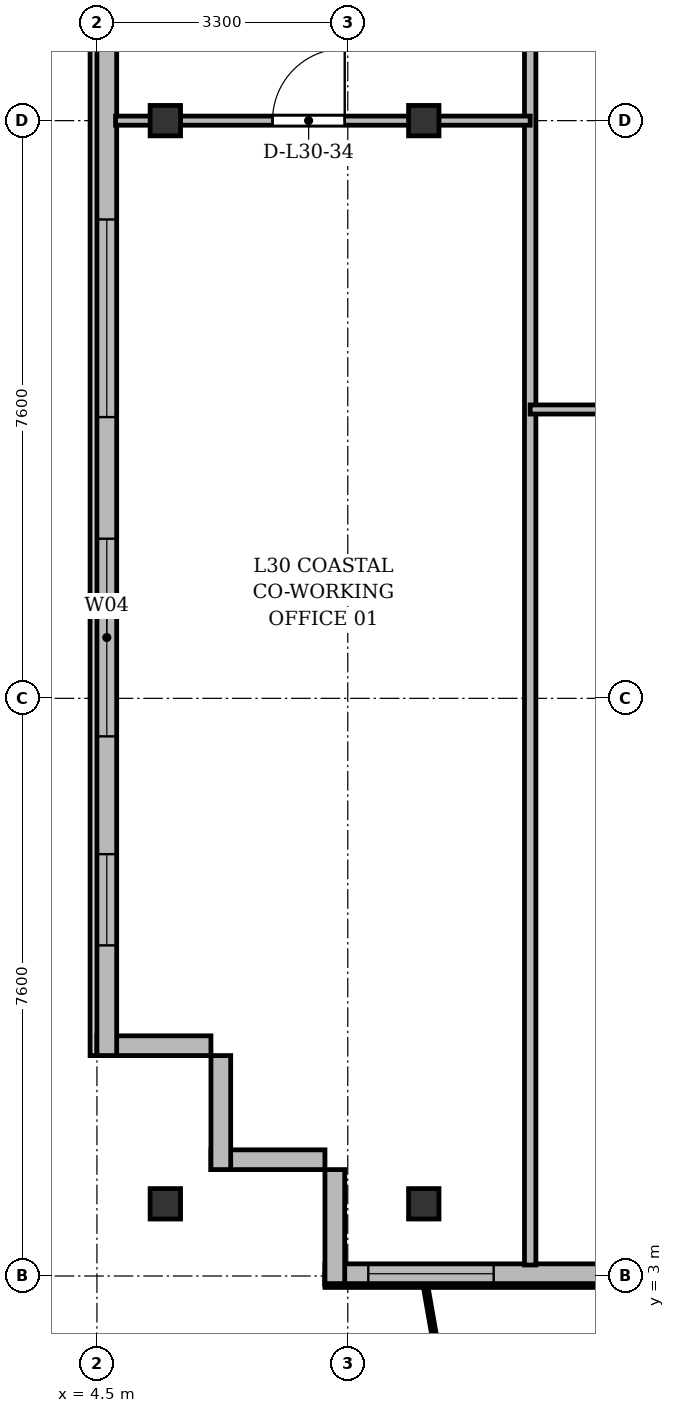
"""IFC4 building model, lengths in metres.
Left out: names, types, materials, properties, quantities, classifications, styles, units other than length and angle.
Written with IfcOpenShell. Run it as: python <this file> out.ifc"""

import sys

from ifc_helpers import new_model, si_unit, direction, frame, frame_2d, origin, origin_2d, place, context, subcontext, project, spatial, rectangle, i_section, extrude, source, transform, mapped, element, fill, save


model = new_model("IFC4")
c1 = context("Model", 3, precision=1e-05, world=origin(), true_north=direction((0.0, 1.0)))
c2 = subcontext(c1, "Body", "Model", "MODEL_VIEW")
j1 = project(units=[si_unit("LENGTHUNIT", "METRE"), si_unit("PLANEANGLEUNIT", "RADIAN")], contexts=[c1])
p1 = place(None, origin())
s1 = spatial("IfcSite", under=j1, at=p1, CompositionType="ELEMENT")
p2 = place(p1, origin())
s2 = spatial("IfcBuilding", under=s1, at=p2, CompositionType="ELEMENT")
p3 = place(p2, frame((0.0, 0.0, 117.7)))
s3 = spatial("IfcBuildingStorey", under=s2, at=p3, CompositionType="ELEMENT", Elevation=117.7)
m1 = source(origin(), c2, "Body", "SweptSolid", [
    extrude(i_section(OverallWidth=0.4, OverallDepth=0.4, WebThickness=0.022, FlangeThickness=0.035, at=origin_2d()), origin(), (0.0, 0.0, 1.0), 3.6),
])
for number, where, z_axis, x_axis in (
    (1, (5.4, 3.95, 0.0), (0.0, 0.0, 1.0), (1.0, 0.0, 0.0)),
    (2, (5.4, 18.2, 0.0), (0.0, 0.0, 1.0), (1.0, 0.0, 0.0)),
    (3, (8.8, 3.95, 0.0), (0.0, 0.0, 1.0), (1.0, 0.0, 0.0)),
    (4, (8.8, 18.2, 0.0), (0.0, 0.0, 1.0), (1.0, 0.0, 0.0)),
):
    element("IfcColumn", number, at=place(p3, frame(where, z_axis=z_axis, x_axis=x_axis)), inside=s3, PredefinedType="COLUMN", context=c2, shape_type="MappedRepresentation", body=[
        mapped(m1, transform((0.0, 0.0, 0.0), x_axis=(1.0, 0.0, 0.0), y_axis=(0.0, 1.0, 0.0), z_axis=(0.0, 0.0, 1.0), scale=1.0)),
    ])
for number, where, z_axis, x_axis in (
    (5, (7.5, 4.53, 0.0), (0.0, 0.0, 1.0), (-1.0, 0.0, 0.0)),
    (6, (6.13, 4.4, 0.0), (0.0, 0.0, 1.0), (0.0, 1.0, 0.0)),
):
    element("IfcWall", number, at=place(p3, frame(where, z_axis=z_axis, x_axis=x_axis)), inside=s3, PredefinedType="SOLIDWALL", context=c2, shape_type="SweptSolid", body=[
        extrude(rectangle(XDim=1.5, YDim=0.26, at=frame_2d((0.75, 0.0))), origin(), (0.0, 0.0, 1.0), 3.34),
    ])
p4 = place(p3, frame((6.0, 6.03, 0.0), z_axis=(0.0, 0.0, 1.0), x_axis=(-1.0, 0.0, 0.0)))
e7 = element("IfcWall", 7, at=p4, inside=s3, PredefinedType="SOLIDWALL", context=c2, shape_type="SweptSolid", body=[
    extrude(rectangle(XDim=1.5, YDim=0.26, at=frame_2d((0.75, 0.0))), origin(), (0.0, 0.0, 1.0), 2.84),
])
p5 = place(p3, frame((4.63, 5.9, 0.0), z_axis=(0.0, 0.0, 1.0), x_axis=(0.0, 1.0, 0.0)))
e8 = element("IfcWall", 8, at=p5, inside=s3, PredefinedType="SOLIDWALL", context=c2, shape_type="SweptSolid", body=[
    extrude(rectangle(XDim=39.6, YDim=0.26, at=frame_2d((19.8, 0.0))), origin(), (0.0, 0.0, 1.0), 3.34),
])
p6 = place(p5, frame((1.45, 0.0, 0.92)))
e9 = element("IfcOpeningElement", 9, at=p6, cuts=e8, PredefinedType="OPENING", context=c2, shape_type="SweptSolid", body=[
    extrude(rectangle(XDim=1.2, YDim=1.65, at=frame_2d((0.6, 0.825))), frame((0.0, 0.14, 0.0), z_axis=(0.0, -1.0, 0.0), x_axis=(1.0, 0.0, 0.0)), (0.0, 0.0, 1.0), 0.28),
])
p7 = place(p5, frame((4.2, 0.0, 0.92)))
e10 = element("IfcOpeningElement", 10, at=p7, cuts=e8, PredefinedType="OPENING", context=c2, shape_type="SweptSolid", body=[
    extrude(rectangle(XDim=2.6, YDim=1.9, at=frame_2d((1.3, 0.95))), frame((0.0, 0.14, 0.0), z_axis=(0.0, -1.0, 0.0), x_axis=(1.0, 0.0, 0.0)), (0.0, 0.0, 1.0), 0.28),
])
p8 = place(p5, frame((8.4, 0.0, 0.92)))
e11 = element("IfcOpeningElement", 11, at=p8, cuts=e8, PredefinedType="OPENING", context=c2, shape_type="SweptSolid", body=[
    extrude(rectangle(XDim=2.6, YDim=1.9, at=frame_2d((1.3, 0.95))), frame((0.0, 0.14, 0.0), z_axis=(0.0, -1.0, 0.0), x_axis=(1.0, 0.0, 0.0)), (0.0, 0.0, 1.0), 0.28),
])
p9 = place(p5, frame((15.6, 0.0, 0.92)))
e12 = element("IfcOpeningElement", 12, at=p9, cuts=e8, PredefinedType="OPENING", context=c2, shape_type="SweptSolid", body=[
    extrude(rectangle(XDim=2.6, YDim=1.9, at=frame_2d((1.3, 0.95))), frame((0.0, 0.14, 0.0), z_axis=(0.0, -1.0, 0.0), x_axis=(1.0, 0.0, 0.0)), (0.0, 0.0, 1.0), 0.28),
])
p10 = place(p5, frame((33.9, 0.0, 0.92)))
e13 = element("IfcOpeningElement", 13, at=p10, cuts=e8, PredefinedType="OPENING", context=c2, shape_type="SweptSolid", body=[
    extrude(rectangle(XDim=1.2, YDim=1.65, at=frame_2d((0.6, 0.825))), frame((0.0, 0.14, 0.0), z_axis=(0.0, -1.0, 0.0), x_axis=(1.0, 0.0, 0.0)), (0.0, 0.0, 1.0), 0.28),
])
p11 = place(p5, frame((37.25, 0.0, 0.92)))
e14 = element("IfcOpeningElement", 14, at=p11, cuts=e8, PredefinedType="OPENING", context=c2, shape_type="SweptSolid", body=[
    extrude(rectangle(XDim=1.2, YDim=1.65, at=frame_2d((0.6, 0.825))), frame((0.0, 0.14, 0.0), z_axis=(0.0, -1.0, 0.0), x_axis=(1.0, 0.0, 0.0)), (0.0, 0.0, 1.0), 0.28),
])
p12 = place(p3, frame((66.9, 3.03, 0.0), z_axis=(0.0, 0.0, 1.0), x_axis=(-1.0, 0.0, 0.0)))
e15 = element("IfcWall", 15, at=p12, inside=s3, PredefinedType="SOLIDWALL", context=c2, shape_type="SweptSolid", body=[
    extrude(rectangle(XDim=59.4, YDim=0.26, at=frame_2d((29.7, 0.0))), origin(), (0.0, 0.0, 1.0), 3.34),
])
p13 = place(p12, frame((0.395, 0.0, 0.9)))
e16 = element("IfcOpeningElement", 16, at=p13, cuts=e15, PredefinedType="OPENING", context=c2, shape_type="SweptSolid", body=[
    extrude(rectangle(XDim=1.8, YDim=1.8, at=frame_2d((0.9, 0.9))), frame((0.0, 0.14, 0.0), z_axis=(0.0, -1.0, 0.0), x_axis=(1.0, 0.0, 0.0)), (0.0, 0.0, 1.0), 0.28),
])
p14 = place(p12, frame((4.2, 0.0, 0.9)))
e17 = element("IfcOpeningElement", 17, at=p14, cuts=e15, PredefinedType="OPENING", context=c2, shape_type="SweptSolid", body=[
    extrude(rectangle(XDim=2.2, YDim=1.8, at=frame_2d((1.1, 0.9))), frame((0.0, 0.14, 0.0), z_axis=(0.0, -1.0, 0.0), x_axis=(1.0, 0.0, 0.0)), (0.0, 0.0, 1.0), 0.28),
])
p15 = place(p12, frame((11.25, 0.0, 0.9)))
e18 = element("IfcOpeningElement", 18, at=p15, cuts=e15, PredefinedType="OPENING", context=c2, shape_type="SweptSolid", body=[
    extrude(rectangle(XDim=1.5, YDim=1.75, at=frame_2d((0.75, 0.875))), frame((0.0, 0.14, 0.0), z_axis=(0.0, -1.0, 0.0), x_axis=(1.0, 0.0, 0.0)), (0.0, 0.0, 1.0), 0.28),
])
p16 = place(p12, frame((16.92, 0.0, 0.0)))
e19 = element("IfcOpeningElement", 19, at=p16, cuts=e15, PredefinedType="OPENING", context=c2, shape_type="SweptSolid", body=[
    extrude(rectangle(XDim=1.2, YDim=2.2, at=frame_2d((0.6, 1.1))), frame((0.0, 0.14, 0.0), z_axis=(0.0, -1.0, 0.0), x_axis=(1.0, 0.0, 0.0)), (0.0, 0.0, 1.0), 0.28),
])
p17 = place(p12, frame((18.675, 0.0, 0.9)))
e20 = element("IfcOpeningElement", 20, at=p17, cuts=e15, PredefinedType="OPENING", context=c2, shape_type="SweptSolid", body=[
    extrude(rectangle(XDim=1.65, YDim=1.85, at=frame_2d((0.825, 0.925))), frame((0.0, 0.14, 0.0), z_axis=(0.0, -1.0, 0.0), x_axis=(1.0, 0.0, 0.0)), (0.0, 0.0, 1.0), 0.28),
])
p18 = place(p12, frame((21.0, 0.0, 0.9)))
e21 = element("IfcOpeningElement", 21, at=p18, cuts=e15, PredefinedType="OPENING", context=c2, shape_type="SweptSolid", body=[
    extrude(rectangle(XDim=1.8, YDim=1.8, at=frame_2d((0.9, 0.9))), frame((0.0, 0.14, 0.0), z_axis=(0.0, -1.0, 0.0), x_axis=(1.0, 0.0, 0.0)), (0.0, 0.0, 1.0), 0.28),
])
p19 = place(p12, frame((26.3, 0.0, 0.9)))
e22 = element("IfcOpeningElement", 22, at=p19, cuts=e15, PredefinedType="OPENING", context=c2, shape_type="SweptSolid", body=[
    extrude(rectangle(XDim=2.2, YDim=1.8, at=frame_2d((1.1, 0.9))), frame((0.0, 0.14, 0.0), z_axis=(0.0, -1.0, 0.0), x_axis=(1.0, 0.0, 0.0)), (0.0, 0.0, 1.0), 0.28),
])
p20 = place(p12, frame((32.8, 0.0, 0.9)))
e23 = element("IfcOpeningElement", 23, at=p20, cuts=e15, PredefinedType="OPENING", context=c2, shape_type="SweptSolid", body=[
    extrude(rectangle(XDim=1.5, YDim=1.75, at=frame_2d((0.75, 0.875))), frame((0.0, 0.14, 0.0), z_axis=(0.0, -1.0, 0.0), x_axis=(1.0, 0.0, 0.0)), (0.0, 0.0, 1.0), 0.28),
])
p21 = place(p12, frame((36.25, 0.0, 0.9)))
e24 = element("IfcOpeningElement", 24, at=p21, cuts=e15, PredefinedType="OPENING", context=c2, shape_type="SweptSolid", body=[
    extrude(rectangle(XDim=2.0, YDim=1.95, at=frame_2d((1.0, 0.975))), frame((0.0, 0.14, 0.0), z_axis=(0.0, -1.0, 0.0), x_axis=(1.0, 0.0, 0.0)), (0.0, 0.0, 1.0), 0.28),
])
p22 = place(p12, frame((39.775, 0.0, 0.9)))
e25 = element("IfcOpeningElement", 25, at=p22, cuts=e15, PredefinedType="OPENING", context=c2, shape_type="SweptSolid", body=[
    extrude(rectangle(XDim=1.65, YDim=1.85, at=frame_2d((0.825, 0.925))), frame((0.0, 0.14, 0.0), z_axis=(0.0, -1.0, 0.0), x_axis=(1.0, 0.0, 0.0)), (0.0, 0.0, 1.0), 0.28),
])
p23 = place(p12, frame((42.7, 0.0, 0.9)))
e26 = element("IfcOpeningElement", 26, at=p23, cuts=e15, PredefinedType="OPENING", context=c2, shape_type="SweptSolid", body=[
    extrude(rectangle(XDim=1.8, YDim=1.8, at=frame_2d((0.9, 0.9))), frame((0.0, 0.14, 0.0), z_axis=(0.0, -1.0, 0.0), x_axis=(1.0, 0.0, 0.0)), (0.0, 0.0, 1.0), 0.28),
])
p24 = place(p12, frame((46.435, 0.0, 0.0)))
e27 = element("IfcOpeningElement", 27, at=p24, cuts=e15, PredefinedType="OPENING", context=c2, shape_type="SweptSolid", body=[
    extrude(rectangle(XDim=1.2, YDim=2.2, at=frame_2d((0.6, 1.1))), frame((0.0, 0.14, 0.0), z_axis=(0.0, -1.0, 0.0), x_axis=(1.0, 0.0, 0.0)), (0.0, 0.0, 1.0), 0.28),
])
p25 = place(p12, frame((49.0, 0.0, 0.9)))
e28 = element("IfcOpeningElement", 28, at=p25, cuts=e15, PredefinedType="OPENING", context=c2, shape_type="SweptSolid", body=[
    extrude(rectangle(XDim=1.5, YDim=1.75, at=frame_2d((0.75, 0.875))), frame((0.0, 0.14, 0.0), z_axis=(0.0, -1.0, 0.0), x_axis=(1.0, 0.0, 0.0)), (0.0, 0.0, 1.0), 0.28),
])
p26 = place(p12, frame((53.0, 0.0, 0.9)))
e29 = element("IfcOpeningElement", 29, at=p26, cuts=e15, PredefinedType="OPENING", context=c2, shape_type="SweptSolid", body=[
    extrude(rectangle(XDim=2.0, YDim=1.95, at=frame_2d((1.0, 0.975))), frame((0.0, 0.14, 0.0), z_axis=(0.0, -1.0, 0.0), x_axis=(1.0, 0.0, 0.0)), (0.0, 0.0, 1.0), 0.28),
])
p27 = place(p12, frame((57.18, 0.0, 0.9)))
e30 = element("IfcOpeningElement", 30, at=p27, cuts=e15, PredefinedType="OPENING", context=c2, shape_type="SweptSolid", body=[
    extrude(rectangle(XDim=1.65, YDim=1.85, at=frame_2d((0.825, 0.925))), frame((0.0, 0.14, 0.0), z_axis=(0.0, -1.0, 0.0), x_axis=(1.0, 0.0, 0.0)), (0.0, 0.0, 1.0), 0.28),
])
p28 = place(p3, frame((7.63, 2.9, 0.0), z_axis=(0.0, 0.0, 1.0), x_axis=(0.0, 1.0, 0.0)))
e31 = element("IfcWall", 31, at=p28, inside=s3, PredefinedType="SOLIDWALL", context=c2, shape_type="SweptSolid", body=[
    extrude(rectangle(XDim=1.5, YDim=0.26, at=frame_2d((0.75, 0.0))), origin(), (0.0, 0.0, 1.0), 2.752),
])
p29 = place(p3, frame((10.2, 3.145, 0.0), z_axis=(0.0, 0.0, 1.0), x_axis=(0.0, 1.0, 0.0)))
e32 = element("IfcWall", 32, at=p29, inside=s3, PredefinedType="PARTITIONING", context=c2, shape_type="SweptSolid", body=[
    extrude(rectangle(XDim=24.455, YDim=0.15, at=frame_2d((12.228, 0.0))), origin(), (0.0, 0.0, 1.0), 2.752),
])
p30 = place(p3, frame((4.745, 18.2, 0.0), z_axis=(0.0, 0.0, 1.0), x_axis=(1.0, 0.0, 0.0)))
e33 = element("IfcWall", 33, at=p30, inside=s3, PredefinedType="PARTITIONING", context=c2, shape_type="SweptSolid", body=[
    extrude(rectangle(XDim=5.455, YDim=0.12, at=frame_2d((2.728, 0.0))), origin(), (0.0, 0.0, 1.0), 2.752),
])
p31 = place(p30, frame((2.065, 0.0, 0.0)))
e34 = element("IfcOpeningElement", 34, at=p31, cuts=e33, PredefinedType="OPENING", context=c2, shape_type="SweptSolid", body=[
    extrude(rectangle(XDim=0.95, YDim=2.15, at=frame_2d((0.475, 1.075))), frame((0.0, 0.07, 0.0), z_axis=(0.0, -1.0, 0.0), x_axis=(1.0, 0.0, 0.0)), (0.0, 0.0, 1.0), 0.14),
])
p32 = place(p3, frame((10.2, 14.4, 0.0), z_axis=(0.0, 0.0, 1.0), x_axis=(1.0, 0.0, 0.0)))
e35 = element("IfcWall", 35, at=p32, inside=s3, PredefinedType="PARTITIONING", context=c2, shape_type="SweptSolid", body=[
    extrude(rectangle(XDim=5.4, YDim=0.12, at=frame_2d((2.7, 0.0))), origin(), (0.0, 0.0, 1.0), 2.84),
])
p33 = place(p32, frame((2.225, 0.0, 0.0)))
e36 = element("IfcOpeningElement", 36, at=p33, cuts=e35, PredefinedType="OPENING", context=c2, shape_type="SweptSolid", body=[
    extrude(rectangle(XDim=0.95, YDim=2.15, at=frame_2d((0.475, 1.075))), frame((0.0, 0.07, 0.0), z_axis=(0.0, -1.0, 0.0), x_axis=(1.0, 0.0, 0.0)), (0.0, 0.0, 1.0), 0.14),
])
m2 = source(origin(), c2, "Body", "SweptSolid", [
    extrude(rectangle(XDim=1.2, YDim=1.65, at=frame_2d((0.6, 0.825))), frame((0.0, 0.03, 0.0), z_axis=(0.0, -1.0, 0.0), x_axis=(1.0, 0.0, 0.0)), (0.0, 0.0, 1.0), 0.06),
])
p34 = place(p6, origin())
e37 = element("IfcWindow", 37, at=p34, inside=s3, PartitioningType="SINGLE_PANEL", PredefinedType="WINDOW", context=c2, shape_type="MappedRepresentation", body=[
    mapped(m2, transform((0.0, 0.0, 0.0), x_axis=(1.0, 0.0, 0.0), y_axis=(0.0, 1.0, 0.0), z_axis=(0.0, 0.0, 1.0), scale=1.0)),
])
fill(e9, e37)
m3 = source(origin(), c2, "Body", "SweptSolid", [
    extrude(rectangle(XDim=2.6, YDim=1.9, at=frame_2d((1.3, 0.95))), frame((0.0, 0.03, 0.0), z_axis=(0.0, -1.0, 0.0), x_axis=(1.0, 0.0, 0.0)), (0.0, 0.0, 1.0), 0.06),
])
p35 = place(p7, origin())
e38 = element("IfcWindow", 38, at=p35, inside=s3, PartitioningType="SINGLE_PANEL", PredefinedType="WINDOW", context=c2, shape_type="MappedRepresentation", body=[
    mapped(m3, transform((0.0, 0.0, 0.0), x_axis=(1.0, 0.0, 0.0), y_axis=(0.0, 1.0, 0.0), z_axis=(0.0, 0.0, 1.0), scale=1.0)),
])
fill(e10, e38)
p36 = place(p8, origin())
e39 = element("IfcWindow", 39, at=p36, inside=s3, PartitioningType="SINGLE_PANEL", PredefinedType="WINDOW", context=c2, shape_type="MappedRepresentation", body=[
    mapped(m3, transform((0.0, 0.0, 0.0), x_axis=(1.0, 0.0, 0.0), y_axis=(0.0, 1.0, 0.0), z_axis=(0.0, 0.0, 1.0), scale=1.0)),
])
fill(e11, e39)
m4 = source(origin(), c2, "Body", "SweptSolid", [
    extrude(rectangle(XDim=1.65, YDim=1.85, at=frame_2d((0.825, 0.925))), frame((0.0, 0.03, 0.0), z_axis=(0.0, -1.0, 0.0), x_axis=(1.0, 0.0, 0.0)), (0.0, 0.0, 1.0), 0.06),
])
p37 = place(p27, origin())
e40 = element("IfcWindow", 40, at=p37, inside=s3, PartitioningType="SINGLE_PANEL", PredefinedType="WINDOW", context=c2, shape_type="MappedRepresentation", body=[
    mapped(m4, transform((0.0, 0.0, 0.0), x_axis=(1.0, 0.0, 0.0), y_axis=(0.0, 1.0, 0.0), z_axis=(0.0, 0.0, 1.0), scale=1.0)),
])
fill(e30, e40)
m5 = source(origin(), c2, "Body", "SweptSolid", [
    extrude(rectangle(XDim=0.95, YDim=2.15, at=frame_2d((0.475, 1.075))), frame((0.0, 0.025, 0.0), z_axis=(0.0, -1.0, 0.0), x_axis=(1.0, 0.0, 0.0)), (0.0, 0.0, 1.0), 0.05),
])
p38 = place(p31, origin())
e41 = element("IfcDoor", 41, at=p38, inside=s3, OperationType="SINGLE_SWING_RIGHT", PredefinedType="DOOR", context=c2, shape_type="MappedRepresentation", body=[
    mapped(m5, transform((0.0, 0.0, 0.0), x_axis=(1.0, 0.0, 0.0), y_axis=(0.0, 1.0, 0.0), z_axis=(0.0, 0.0, 1.0), scale=1.0)),
])
fill(e34, e41)
save(model, sys.argv[1])
